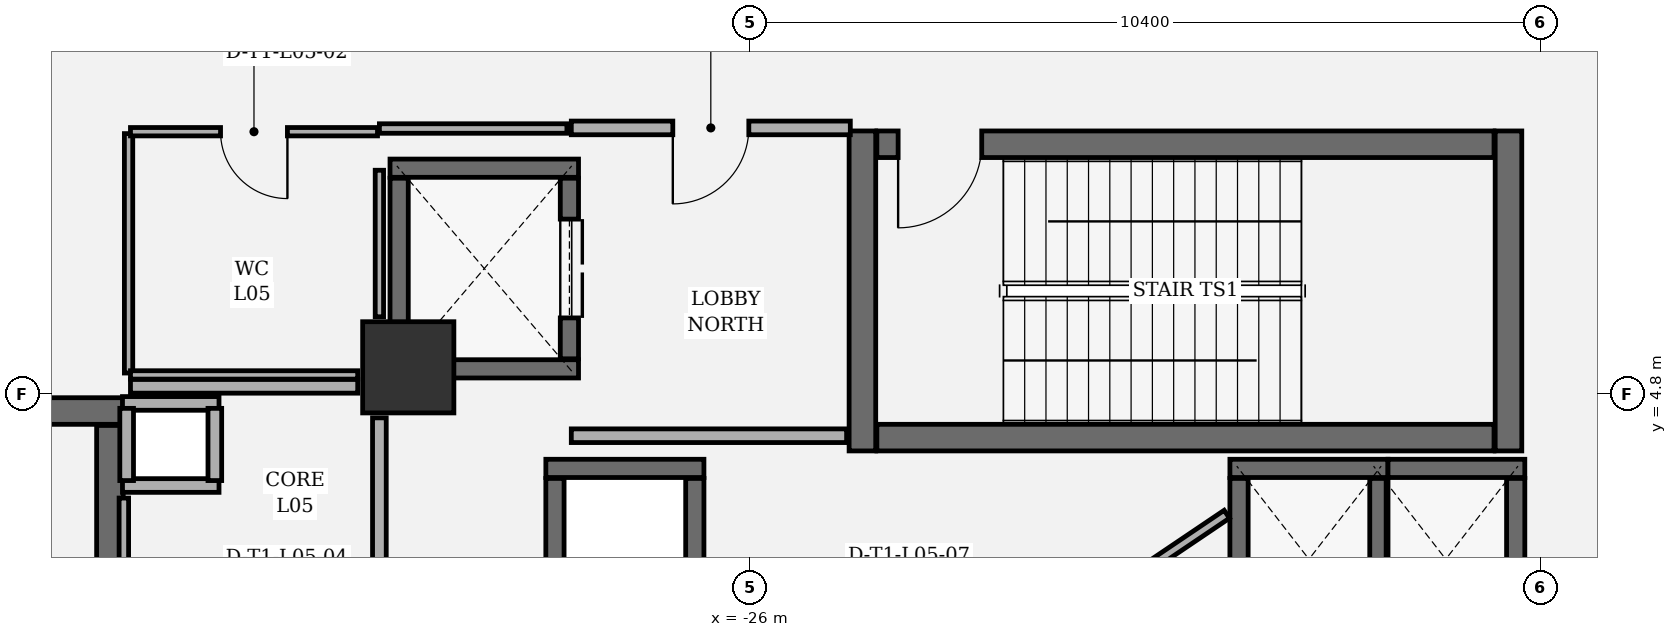
"""IFC4 building model, lengths in metres.
Left out: names, types, materials, properties, quantities, classifications, styles, units other than length and angle.
Written with IfcOpenShell. Run it as: python <this file> out.ifc"""

import sys

from ifc_helpers import new_model, si_unit, direction, frame, frame_2d, origin, origin_2d, place, context, subcontext, project, spatial, rectangle, extrude, element, fill, save


model = new_model("IFC4")
c1 = context("Model", 3, precision=1e-05, world=origin(), true_north=direction((0.0, 1.0)))
c2 = subcontext(c1, "Body", "Model", "MODEL_VIEW")
j1 = project(units=[si_unit("LENGTHUNIT", "METRE"), si_unit("PLANEANGLEUNIT", "RADIAN")], contexts=[c1])
p1 = place(None, origin())
s1 = spatial("IfcSite", under=j1, at=p1, CompositionType="ELEMENT")
p2 = place(p1, origin())
s2 = spatial("IfcBuilding", under=s1, at=p2, CompositionType="ELEMENT")
p3 = place(p2, frame((0.0, 0.0, 27.0)))
s3 = spatial("IfcBuildingStorey", under=s2, at=p3, CompositionType="ELEMENT", Elevation=27.0)
p4 = place(p3, frame((-30.5, 5.15, 0.0), z_axis=(0.0, 0.0, 1.0), x_axis=(1.0, 0.0, 0.0)))
e1 = element("IfcColumn", 1, at=p4, inside=s3, PredefinedType="COLUMN", context=c2, shape_type="SweptSolid", body=[
    extrude(rectangle(XDim=1.2, YDim=1.2, at=origin_2d()), origin(), (0.0, 0.0, 1.0), 5.4),
])
p5 = place(p3, frame((-64.419, 4.637, 0.0), z_axis=(0.0, 0.0, 1.0), x_axis=(0.842602364841, 0.538536214905, 0.0)))
e2 = element("IfcWall", 2, at=p5, inside=s3, PredefinedType="SOLIDWALL", context=c2, shape_type="SweptSolid", body=[
    extrude(rectangle(XDim=60.27, YDim=0.38, at=frame_2d((30.135, 0.0))), origin(), (0.0, 0.0, 1.0), 5.12),
])
p6 = place(p5, frame((29.435, 0.0, 0.8)))
e3 = element("IfcOpeningElement", 3, at=p6, cuts=e2, PredefinedType="OPENING", context=c2, shape_type="SweptSolid", body=[
    extrude(rectangle(XDim=1.4, YDim=1.5, at=frame_2d((0.7, 0.75))), frame((0.0, 0.2, 0.0), z_axis=(0.0, -1.0, 0.0), x_axis=(1.0, 0.0, 0.0)), (0.0, 0.0, 1.0), 0.4),
])
for number, where, z_axis, x_axis in (
    (4, (-24.525, 8.26, 0.0), (0.0, 0.0, 1.0), (0.0, -1.0, 0.0)),
    (5, (-16.025, 4.05, 0.0), (0.0, 0.0, 1.0), (0.0, 1.0, 0.0)),
):
    element("IfcWall", number, at=place(p3, frame(where, z_axis=z_axis, x_axis=x_axis)), inside=s3, PredefinedType="SHEAR", context=c2, shape_type="SweptSolid", body=[
        extrude(rectangle(XDim=4.21, YDim=0.35, at=frame_2d((2.105, 0.0))), origin(), (0.0, 0.0, 1.0), 5.12),
    ])
p7 = place(p3, frame((-24.335, 4.225, 0.0), z_axis=(0.0, 0.0, 1.0), x_axis=(1.0, 0.0, 0.0)))
e6 = element("IfcWall", 6, at=p7, inside=s3, PredefinedType="SHEAR", context=c2, shape_type="SweptSolid", body=[
    extrude(rectangle(XDim=8.12, YDim=0.35, at=frame_2d((4.06, 0.0))), origin(), (0.0, 0.0, 1.0), 5.12),
])
p8 = place(p3, frame((-16.215, 8.085, 0.0), z_axis=(0.0, 0.0, 1.0), x_axis=(-1.0, 0.0, 0.0)))
e7 = element("IfcWall", 7, at=p8, inside=s3, PredefinedType="SHEAR", context=c2, shape_type="SweptSolid", body=[
    extrude(rectangle(XDim=8.12, YDim=0.35, at=frame_2d((4.06, 0.0))), origin(), (0.0, 0.0, 1.0), 5.12),
])
p9 = place(p8, frame((6.74, 0.0, 0.0)))
e8 = element("IfcOpeningElement", 8, at=p9, cuts=e7, PredefinedType="OPENING", context=c2, shape_type="SweptSolid", body=[
    extrude(rectangle(XDim=1.1, YDim=2.2, at=frame_2d((0.55, 1.1))), frame((0.0, 0.185, 0.0), z_axis=(0.0, -1.0, 0.0), x_axis=(1.0, 0.0, 0.0)), (0.0, 0.0, 1.0), 0.37),
])
p10 = place(p3, frame((-34.25, 4.575, 0.0), z_axis=(0.0, 0.0, 1.0), x_axis=(-1.0, 0.0, 0.0)))
e9 = element("IfcWall", 9, at=p10, inside=s3, PredefinedType="SHEAR", context=c2, shape_type="SweptSolid", body=[
    extrude(rectangle(XDim=4.21, YDim=0.35, at=frame_2d((2.105, 0.0))), origin(), (0.0, 0.0, 1.0), 5.12),
])
p11 = place(p3, frame((-34.425, -4.385, 0.0), z_axis=(0.0, 0.0, 1.0), x_axis=(0.0, 1.0, 0.0)))
e10 = element("IfcWall", 10, at=p11, inside=s3, PredefinedType="SHEAR", context=c2, shape_type="SweptSolid", body=[
    extrude(rectangle(XDim=8.77, YDim=0.35, at=frame_2d((4.385, 0.0))), origin(), (0.0, 0.0, 1.0), 5.12),
])
for number, where, z_axis, x_axis in (
    (11, (-28.26, 5.13, 0.0), (0.0, 0.0, 1.0), (-1.0, 0.0, 0.0)),
    (12, (-30.74, 7.77, 0.0), (0.0, 0.0, 1.0), (1.0, 0.0, 0.0)),
):
    element("IfcWall", number, at=place(p3, frame(where, z_axis=z_axis, x_axis=x_axis)), inside=s3, PredefinedType="SHEAR", context=c2, shape_type="SweptSolid", body=[
        extrude(rectangle(XDim=2.48, YDim=0.24, at=frame_2d((1.24, 0.0))), origin(), (0.0, 0.0, 1.0), 5.12),
    ])
p12 = place(p3, frame((-30.62, 5.262, 0.0), z_axis=(0.0, 0.0, 1.0), x_axis=(0.0, 1.0, 0.0)))
e13 = element("IfcWall", 13, at=p12, inside=s3, PredefinedType="SHEAR", context=c2, shape_type="SweptSolid", body=[
    extrude(rectangle(XDim=2.376, YDim=0.24, at=frame_2d((1.188, 0.0))), origin(), (0.0, 0.0, 1.0), 5.12),
])
p13 = place(p3, frame((-28.38, 7.638, 0.0), z_axis=(0.0, 0.0, 1.0), x_axis=(0.0, -1.0, 0.0)))
e14 = element("IfcWall", 14, at=p13, inside=s3, PredefinedType="SHEAR", context=c2, shape_type="SweptSolid", body=[
    extrude(rectangle(XDim=2.376, YDim=0.24, at=frame_2d((1.188, 0.0))), origin(), (0.0, 0.0, 1.0), 5.12),
])
p14 = place(p13, frame((0.538, 0.0, 0.0)))
e15 = element("IfcOpeningElement", 15, at=p14, cuts=e14, PredefinedType="OPENING", context=c2, shape_type="SweptSolid", body=[
    extrude(rectangle(XDim=1.3, YDim=2.3, at=frame_2d((0.65, 1.15))), frame((0.0, 0.13, 0.0), z_axis=(0.0, -1.0, 0.0), x_axis=(1.0, 0.0, 0.0)), (0.0, 0.0, 1.0), 0.26),
])
p15 = place(p3, frame((-28.69, 3.82, 0.0), z_axis=(0.0, 0.0, 1.0), x_axis=(1.0, 0.0, 0.0)))
e16 = element("IfcWall", 16, at=p15, inside=s3, PredefinedType="SHEAR", context=c2, shape_type="SweptSolid", body=[
    extrude(rectangle(XDim=2.08, YDim=0.24, at=frame_2d((1.04, 0.0))), origin(), (0.0, 0.0, 1.0), 5.12),
])
for number, where, z_axis, x_axis in (
    (17, (-28.57, 1.562, 0.0), (0.0, 0.0, 1.0), (0.0, 1.0, 0.0)),
    (18, (-26.73, 3.688, 0.0), (0.0, 0.0, 1.0), (0.0, -1.0, 0.0)),
):
    element("IfcWall", number, at=place(p3, frame(where, z_axis=z_axis, x_axis=x_axis)), inside=s3, PredefinedType="SHEAR", context=c2, shape_type="SweptSolid", body=[
        extrude(rectangle(XDim=2.126, YDim=0.24, at=frame_2d((1.063, 0.0))), origin(), (0.0, 0.0, 1.0), 5.12),
    ])
p16 = place(p3, frame((-19.69, 3.82, 0.0), z_axis=(0.0, 0.0, 1.0), x_axis=(1.0, 0.0, 0.0)))
e19 = element("IfcWall", 19, at=p16, inside=s3, PredefinedType="SHEAR", context=c2, shape_type="SweptSolid", body=[
    extrude(rectangle(XDim=2.08, YDim=0.24, at=frame_2d((1.04, 0.0))), origin(), (0.0, 0.0, 1.0), 5.12),
])
for number, where, z_axis, x_axis in (
    (20, (-19.57, 1.562, 0.0), (0.0, 0.0, 1.0), (0.0, 1.0, 0.0)),
    (21, (-17.73, 3.688, 0.0), (0.0, 0.0, 1.0), (0.0, -1.0, 0.0)),
):
    element("IfcWall", number, at=place(p3, frame(where, z_axis=z_axis, x_axis=x_axis)), inside=s3, PredefinedType="SHEAR", context=c2, shape_type="SweptSolid", body=[
        extrude(rectangle(XDim=2.126, YDim=0.24, at=frame_2d((1.063, 0.0))), origin(), (0.0, 0.0, 1.0), 5.12),
    ])
p17 = place(p3, frame((-17.61, 3.82, 0.0), z_axis=(0.0, 0.0, 1.0), x_axis=(1.0, 0.0, 0.0)))
e22 = element("IfcWall", 22, at=p17, inside=s3, PredefinedType="SHEAR", context=c2, shape_type="SweptSolid", body=[
    extrude(rectangle(XDim=1.8, YDim=0.24, at=frame_2d((0.9, 0.0))), origin(), (0.0, 0.0, 1.0), 5.12),
])
p18 = place(p3, frame((-15.93, 3.688, 0.0), z_axis=(0.0, 0.0, 1.0), x_axis=(0.0, -1.0, 0.0)))
e23 = element("IfcWall", 23, at=p18, inside=s3, PredefinedType="SHEAR", context=c2, shape_type="SweptSolid", body=[
    extrude(rectangle(XDim=2.126, YDim=0.24, at=frame_2d((1.063, 0.0))), origin(), (0.0, 0.0, 1.0), 5.12),
])
for number, where, z_axis, x_axis in (
    (24, (-32.99, 3.595, 0.0), (0.0, 0.0, 1.0), (-1.0, 0.0, 0.0)),
    (25, (-34.26, 4.675, 0.0), (0.0, 0.0, 1.0), (1.0, 0.0, 0.0)),
):
    element("IfcWall", number, at=place(p3, frame(where, z_axis=z_axis, x_axis=x_axis)), inside=s3, PredefinedType="PARTITIONING", context=c2, shape_type="SweptSolid", body=[
        extrude(rectangle(XDim=1.27, YDim=0.18, at=frame_2d((0.635, 0.0))), origin(), (0.0, 0.0, 1.0), 5.12),
    ])
for number, where, z_axis, x_axis in (
    (26, (-34.205, 3.66, 0.0), (0.0, 0.0, 1.0), (0.0, 1.0, 0.0)),
    (27, (-33.045, 4.61, 0.0), (0.0, 0.0, 1.0), (0.0, -1.0, 0.0)),
):
    element("IfcWall", number, at=place(p3, frame(where, z_axis=z_axis, x_axis=x_axis)), inside=s3, PredefinedType="PARTITIONING", context=c2, shape_type="SweptSolid", body=[
        extrude(rectangle(XDim=0.95, YDim=0.18, at=frame_2d((0.475, 0.0))), origin(), (0.0, 0.0, 1.0), 5.12),
    ])
p19 = place(p3, frame((-28.355, 4.25, 0.0), z_axis=(0.0, 0.0, 1.0), x_axis=(1.0, 0.0, 0.0)))
e28 = element("IfcWall", 28, at=p19, inside=s3, PredefinedType="PARTITIONING", context=c2, shape_type="SweptSolid", body=[
    extrude(rectangle(XDim=3.622, YDim=0.18, at=frame_2d((1.811, 0.0))), origin(), (0.0, 0.0, 1.0), 5.12),
])
p20 = place(p3, frame((-24.684, 8.3, 0.0), z_axis=(0.0, 0.0, 1.0), x_axis=(-1.0, 0.0, 0.0)))
e29 = element("IfcWall", 29, at=p20, inside=s3, PredefinedType="PARTITIONING", context=c2, shape_type="SweptSolid", body=[
    extrude(rectangle(XDim=3.671, YDim=0.18, at=frame_2d((1.835, 0.0))), origin(), (0.0, 0.0, 1.0), 5.12),
])
p21 = place(p20, frame((1.335, 0.0, 0.0)))
e30 = element("IfcOpeningElement", 30, at=p21, cuts=e29, PredefinedType="OPENING", context=c2, shape_type="SweptSolid", body=[
    extrude(rectangle(XDim=1.0, YDim=2.15, at=frame_2d((0.5, 1.075))), frame((0.0, 0.1, 0.0), z_axis=(0.0, -1.0, 0.0), x_axis=(1.0, 0.0, 0.0)), (0.0, 0.0, 1.0), 0.2),
])
p22 = place(p3, frame((-34.18, 8.225, 0.0), z_axis=(0.0, 0.0, 1.0), x_axis=(0.0, -1.0, 0.0)))
e31 = element("IfcWall", 31, at=p22, inside=s3, PredefinedType="PARTITIONING", context=c2, shape_type="SweptSolid", body=[
    extrude(rectangle(XDim=3.15, YDim=0.11, at=frame_2d((1.575, 0.0))), origin(), (0.0, 0.0, 1.0), 5.12),
])
p23 = place(p3, frame((-34.155, 5.05, 0.0), z_axis=(0.0, 0.0, 1.0), x_axis=(1.0, 0.0, 0.0)))
e32 = element("IfcWall", 32, at=p23, inside=s3, PredefinedType="PARTITIONING", context=c2, shape_type="SweptSolid", body=[
    extrude(rectangle(XDim=2.99, YDim=0.11, at=frame_2d((1.495, 0.0))), origin(), (0.0, 0.0, 1.0), 5.12),
])
p24 = place(p3, frame((-30.88, 5.815, 0.0), z_axis=(0.0, 0.0, 1.0), x_axis=(0.0, 1.0, 0.0)))
e33 = element("IfcWall", 33, at=p24, inside=s3, PredefinedType="PARTITIONING", context=c2, shape_type="SweptSolid", body=[
    extrude(rectangle(XDim=1.928, YDim=0.11, at=frame_2d((0.964, 0.0))), origin(), (0.0, 0.0, 1.0), 5.12),
])
p25 = place(p3, frame((-30.905, 8.25, 0.0), z_axis=(0.0, 0.0, 1.0), x_axis=(-1.0, 0.0, 0.0)))
e34 = element("IfcWall", 34, at=p25, inside=s3, PredefinedType="PARTITIONING", context=c2, shape_type="SweptSolid", body=[
    extrude(rectangle(XDim=3.25, YDim=0.11, at=frame_2d((1.625, 0.0))), origin(), (0.0, 0.0, 1.0), 2.69),
])
p26 = place(p25, frame((1.185, 0.0, 0.0)))
e35 = element("IfcOpeningElement", 35, at=p26, cuts=e34, PredefinedType="OPENING", context=c2, shape_type="SweptSolid", body=[
    extrude(rectangle(XDim=0.88, YDim=2.1, at=frame_2d((0.44, 1.05))), frame((0.0, 0.065, 0.0), z_axis=(0.0, -1.0, 0.0), x_axis=(1.0, 0.0, 0.0)), (0.0, 0.0, 1.0), 0.13),
])
p27 = place(p3, frame((-30.88, 1.625, 0.0), z_axis=(0.0, 0.0, 1.0), x_axis=(0.0, 1.0, 0.0)))
e36 = element("IfcWall", 36, at=p27, inside=s3, PredefinedType="PARTITIONING", context=c2, shape_type="SweptSolid", body=[
    extrude(rectangle(XDim=2.86, YDim=0.18, at=frame_2d((1.43, 0.0))), origin(), (0.0, 0.0, 1.0), 5.12),
])
p28 = place(p3, frame((-31.165, 4.9, 0.0), z_axis=(0.0, 0.0, 1.0), x_axis=(-1.0, 0.0, 0.0)))
e37 = element("IfcWall", 37, at=p28, inside=s3, PredefinedType="PARTITIONING", context=c2, shape_type="SweptSolid", body=[
    extrude(rectangle(XDim=2.99, YDim=0.18, at=frame_2d((1.495, 0.0))), origin(), (0.0, 0.0, 1.0), 5.12),
])
p29 = place(p3, frame((-28.413, 8.292, 0.0), z_axis=(0.0, 0.0, 1.0), x_axis=(-1.0, 0.0, 0.0)))
e38 = element("IfcWall", 38, at=p29, inside=s3, PredefinedType="PARTITIONING", context=c2, shape_type="SweptSolid", body=[
    extrude(rectangle(XDim=2.467, YDim=0.125, at=frame_2d((1.233, 0.0))), origin(), (0.0, 0.0, 1.0), 4.633),
])
p30 = place(p3, frame((-34.242, 3.43, 0.0), z_axis=(0.0, 0.0, 1.0), x_axis=(0.0, -1.0, 0.0)))
e39 = element("IfcWall", 39, at=p30, inside=s3, PredefinedType="PARTITIONING", context=c2, shape_type="SweptSolid", body=[
    extrude(rectangle(XDim=1.877, YDim=0.125, at=frame_2d((0.938, 0.0))), origin(), (0.0, 0.0, 1.0), 5.12),
])
p31 = place(p3, frame((-22.169, 1.572, 0.0), z_axis=(0.0, 0.0, 1.0), x_axis=(0.829063181021, 0.559154935483, 0.0)))
e40 = element("IfcWall", 40, at=p31, inside=s3, PredefinedType="PARTITIONING", context=c2, shape_type="SweptSolid", body=[
    extrude(rectangle(XDim=2.942, YDim=0.125, at=frame_2d((1.471, 0.0))), origin(), (0.0, 0.0, 1.0), 5.12),
])
p32 = place(p9, origin())
e41 = element("IfcDoor", 41, at=p32, inside=s3, OperationType="SINGLE_SWING_RIGHT", PredefinedType="DOOR", context=c2, shape_type="SweptSolid", body=[
    extrude(rectangle(XDim=1.1, YDim=2.2, at=frame_2d((0.55, 1.1))), frame((0.0, 0.025, 0.0), z_axis=(0.0, -1.0, 0.0), x_axis=(1.0, 0.0, 0.0)), (0.0, 0.0, 1.0), 0.05),
])
fill(e8, e41)
p33 = place(p14, origin())
e42 = element("IfcDoor", 42, at=p33, inside=s3, OperationType="DOUBLE_DOOR_SLIDING", PredefinedType="DOOR", context=c2, shape_type="SweptSolid", body=[
    extrude(rectangle(XDim=1.3, YDim=2.3, at=frame_2d((0.65, 1.15))), frame((0.0, 0.025, 0.0), z_axis=(0.0, -1.0, 0.0), x_axis=(1.0, 0.0, 0.0)), (0.0, 0.0, 1.0), 0.05),
])
fill(e15, e42)
p34 = place(p21, origin())
e43 = element("IfcDoor", 43, at=p34, inside=s3, OperationType="SINGLE_SWING_RIGHT", PredefinedType="DOOR", context=c2, shape_type="SweptSolid", body=[
    extrude(rectangle(XDim=1.0, YDim=2.15, at=frame_2d((0.5, 1.075))), frame((0.0, 0.025, 0.0), z_axis=(0.0, -1.0, 0.0), x_axis=(1.0, 0.0, 0.0)), (0.0, 0.0, 1.0), 0.05),
])
fill(e30, e43)
p35 = place(p26, origin())
e44 = element("IfcDoor", 44, at=p35, inside=s3, OperationType="SINGLE_SWING_LEFT", PredefinedType="DOOR", context=c2, shape_type="SweptSolid", body=[
    extrude(rectangle(XDim=0.88, YDim=2.1, at=frame_2d((0.44, 1.05))), frame((0.0, 0.025, 0.0), z_axis=(0.0, -1.0, 0.0), x_axis=(1.0, 0.0, 0.0)), (0.0, 0.0, 1.0), 0.05),
])
fill(e35, e44)
save(model, sys.argv[1])
